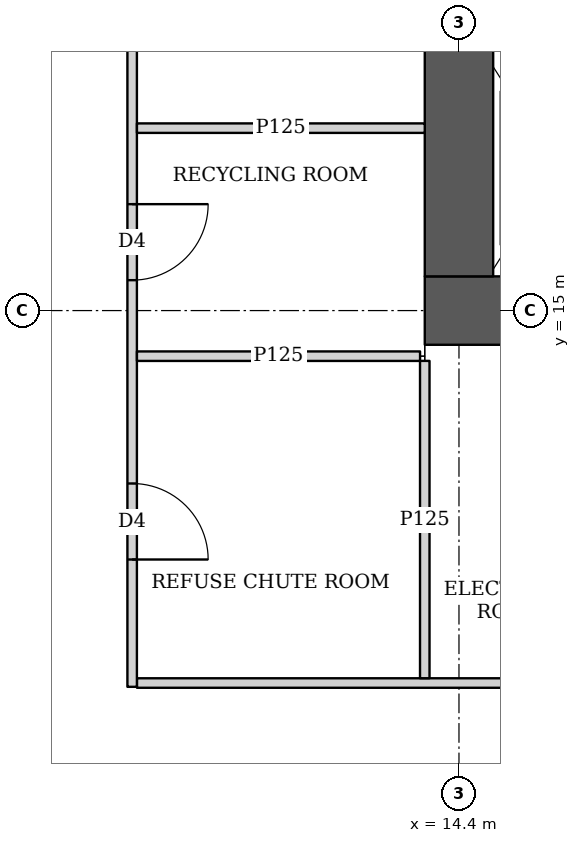
"""IFC4 building model, lengths in metres.
Left out: names, types, materials, properties, quantities, classifications, styles, units other than length and angle.
Written with IfcOpenShell. Run it as: python <this file> out.ifc"""

import sys

from ifc_helpers import new_model, si_unit, direction, frame, frame_2d, origin, place, context, subcontext, project, spatial, rectangle, extrude, element, fill, save


model = new_model("IFC4")
c1 = context("Model", 3, precision=1e-05, world=origin(), true_north=direction((0.0, 1.0)))
c2 = subcontext(c1, "Body", "Model", "MODEL_VIEW")
j1 = project(units=[si_unit("LENGTHUNIT", "METRE"), si_unit("PLANEANGLEUNIT", "RADIAN")], contexts=[c1])
p1 = place(None, origin())
s1 = spatial("IfcSite", under=j1, at=p1, CompositionType="ELEMENT")
p2 = place(p1, origin())
s2 = spatial("IfcBuilding", under=s1, at=p2, CompositionType="ELEMENT")
p3 = place(p2, frame((0.0, 0.0, 53.75)))
s3 = spatial("IfcBuildingStorey", under=s2, at=p3, CompositionType="ELEMENT", Elevation=53.75)
p4 = place(p3, frame((13.95, 15.0, 0.0), z_axis=(0.0, 0.0, 1.0), x_axis=(1.0, 0.0, 0.0)))
e1 = element("IfcWall", 1, at=p4, inside=s3, PredefinedType="SHEAR", context=c2, shape_type="SweptSolid", body=[
    extrude(rectangle(XDim=15.3, YDim=0.9, at=frame_2d((7.65, 0.0))), origin(), (0.0, 0.0, 1.0), 3.75),
])
p5 = place(p4, frame((4.45, 0.0, 0.0)))
e2 = element("IfcOpeningElement", 2, at=p5, cuts=e1, PredefinedType="OPENING", context=c2, shape_type="SweptSolid", body=[
    extrude(rectangle(XDim=1.8, YDim=2.1, at=frame_2d((0.9, 1.05))), frame((0.0, 0.46, 0.0), z_axis=(0.0, -1.0, 0.0), x_axis=(1.0, 0.0, 0.0)), (0.0, 0.0, 1.0), 0.92),
])
p6 = place(p4, frame((10.7, 0.0, 0.0)))
e3 = element("IfcOpeningElement", 3, at=p6, cuts=e1, PredefinedType="OPENING", context=c2, shape_type="SweptSolid", body=[
    extrude(rectangle(XDim=1.1, YDim=2.1, at=frame_2d((0.55, 1.05))), frame((0.0, 0.46, 0.0), z_axis=(0.0, -1.0, 0.0), x_axis=(1.0, 0.0, 0.0)), (0.0, 0.0, 1.0), 0.92),
])
p7 = place(p3, frame((14.4, 15.45, 0.0), z_axis=(0.0, 0.0, 1.0), x_axis=(0.0, 1.0, 0.0)))
e4 = element("IfcWall", 4, at=p7, inside=s3, PredefinedType="SHEAR", context=c2, shape_type="SweptSolid", body=[
    extrude(rectangle(XDim=14.1, YDim=0.9, at=frame_2d((7.05, 0.0))), origin(), (0.0, 0.0, 1.0), 3.75),
])
p8 = place(p3, frame((10.1, 10.05, 0.0), z_axis=(0.0, 0.0, 1.0), x_axis=(0.0, 1.0, 0.0)))
e5 = element("IfcWall", 5, at=p8, inside=s3, PredefinedType="PARTITIONING", context=c2, shape_type="SweptSolid", body=[
    extrude(rectangle(XDim=24.9, YDim=0.125, at=frame_2d((12.45, 0.0))), origin(), (0.0, 0.0, 1.0), 3.5),
])
p9 = place(p8, frame((1.675, 0.0, 0.0)))
e6 = element("IfcOpeningElement", 6, at=p9, cuts=e5, PredefinedType="OPENING", context=c2, shape_type="SweptSolid", body=[
    extrude(rectangle(XDim=1.0, YDim=2.1, at=frame_2d((0.5, 1.05))), frame((0.0, 0.073, 0.0), z_axis=(0.0, -1.0, 0.0), x_axis=(1.0, 0.0, 0.0)), (0.0, 0.0, 1.0), 0.145),
])
p10 = place(p8, frame((5.35, 0.0, 0.0)))
e7 = element("IfcOpeningElement", 7, at=p10, cuts=e5, PredefinedType="OPENING", context=c2, shape_type="SweptSolid", body=[
    extrude(rectangle(XDim=1.0, YDim=2.1, at=frame_2d((0.5, 1.05))), frame((0.0, 0.073, 0.0), z_axis=(0.0, -1.0, 0.0), x_axis=(1.0, 0.0, 0.0)), (0.0, 0.0, 1.0), 0.145),
])
p11 = place(p8, frame((11.05, 0.0, 0.0)))
e8 = element("IfcOpeningElement", 8, at=p11, cuts=e5, PredefinedType="OPENING", context=c2, shape_type="SweptSolid", body=[
    extrude(rectangle(XDim=1.0, YDim=2.1, at=frame_2d((0.5, 1.05))), frame((0.0, 0.073, 0.0), z_axis=(0.0, -1.0, 0.0), x_axis=(1.0, 0.0, 0.0)), (0.0, 0.0, 1.0), 0.145),
])
p12 = place(p8, frame((18.35, 0.0, 0.0)))
e9 = element("IfcOpeningElement", 9, at=p12, cuts=e5, PredefinedType="OPENING", context=c2, shape_type="SweptSolid", body=[
    extrude(rectangle(XDim=1.0, YDim=2.1, at=frame_2d((0.5, 1.05))), frame((0.0, 0.073, 0.0), z_axis=(0.0, -1.0, 0.0), x_axis=(1.0, 0.0, 0.0)), (0.0, 0.0, 1.0), 0.145),
])
p13 = place(p8, frame((22.925, 0.0, 0.0)))
e10 = element("IfcOpeningElement", 10, at=p13, cuts=e5, PredefinedType="OPENING", context=c2, shape_type="SweptSolid", body=[
    extrude(rectangle(XDim=1.0, YDim=2.1, at=frame_2d((0.5, 1.05))), frame((0.0, 0.073, 0.0), z_axis=(0.0, -1.0, 0.0), x_axis=(1.0, 0.0, 0.0)), (0.0, 0.0, 1.0), 0.145),
])
p14 = place(p3, frame((10.163, 14.4, 0.0), z_axis=(0.0, 0.0, 1.0), x_axis=(1.0, 0.0, 0.0)))
e11 = element("IfcWall", 11, at=p14, inside=s3, PredefinedType="PARTITIONING", context=c2, shape_type="SweptSolid", body=[
    extrude(rectangle(XDim=3.725, YDim=0.125, at=frame_2d((1.862, 0.0))), origin(), (0.0, 0.0, 1.0), 3.5),
])
p15 = place(p3, frame((10.163, 17.4, 0.0), z_axis=(0.0, 0.0, 1.0), x_axis=(1.0, 0.0, 0.0)))
e12 = element("IfcWall", 12, at=p15, inside=s3, PredefinedType="PARTITIONING", context=c2, shape_type="SweptSolid", body=[
    extrude(rectangle(XDim=3.787, YDim=0.125, at=frame_2d((1.894, 0.0))), origin(), (0.0, 0.0, 1.0), 3.5),
])
p16 = place(p3, frame((13.95, 10.163, 0.0), z_axis=(0.0, 0.0, 1.0), x_axis=(0.0, 1.0, 0.0)))
e13 = element("IfcWall", 13, at=p16, inside=s3, PredefinedType="PARTITIONING", context=c2, shape_type="SweptSolid", body=[
    extrude(rectangle(XDim=4.175, YDim=0.125, at=frame_2d((2.087, 0.0))), origin(), (0.0, 0.0, 1.0), 3.5),
])
p17 = place(p3, frame((10.163, 10.1, 0.0), z_axis=(0.0, 0.0, 1.0), x_axis=(1.0, 0.0, 0.0)))
e14 = element("IfcWall", 14, at=p17, inside=s3, PredefinedType="PARTITIONING", context=c2, shape_type="SweptSolid", body=[
    extrude(rectangle(XDim=11.287, YDim=0.125, at=frame_2d((5.644, 0.0))), origin(), (0.0, 0.0, 1.0), 3.5),
])
p18 = place(p17, frame((7.832, 0.0, 0.0)))
e15 = element("IfcOpeningElement", 15, at=p18, cuts=e14, PredefinedType="OPENING", context=c2, shape_type="SweptSolid", body=[
    extrude(rectangle(XDim=1.8, YDim=2.1, at=frame_2d((0.9, 1.05))), frame((0.0, 0.073, 0.0), z_axis=(0.0, -1.0, 0.0), x_axis=(1.0, 0.0, 0.0)), (0.0, 0.0, 1.0), 0.145),
])
p19 = place(p9, origin())
e16 = element("IfcDoor", 16, at=p19, inside=s3, OperationType="SINGLE_SWING_RIGHT", PredefinedType="DOOR", context=c2, shape_type="SweptSolid", body=[
    extrude(rectangle(XDim=1.0, YDim=2.1, at=frame_2d((0.5, 1.05))), frame((0.0, 0.025, 0.0), z_axis=(0.0, -1.0, 0.0), x_axis=(1.0, 0.0, 0.0)), (0.0, 0.0, 1.0), 0.05),
])
fill(e6, e16)
p20 = place(p10, origin())
e17 = element("IfcDoor", 17, at=p20, inside=s3, OperationType="SINGLE_SWING_LEFT", PredefinedType="DOOR", context=c2, shape_type="SweptSolid", body=[
    extrude(rectangle(XDim=1.0, YDim=2.1, at=frame_2d((0.5, 1.05))), frame((0.0, 0.025, 0.0), z_axis=(0.0, -1.0, 0.0), x_axis=(1.0, 0.0, 0.0)), (0.0, 0.0, 1.0), 0.05),
])
fill(e7, e17)
save(model, sys.argv[1])
